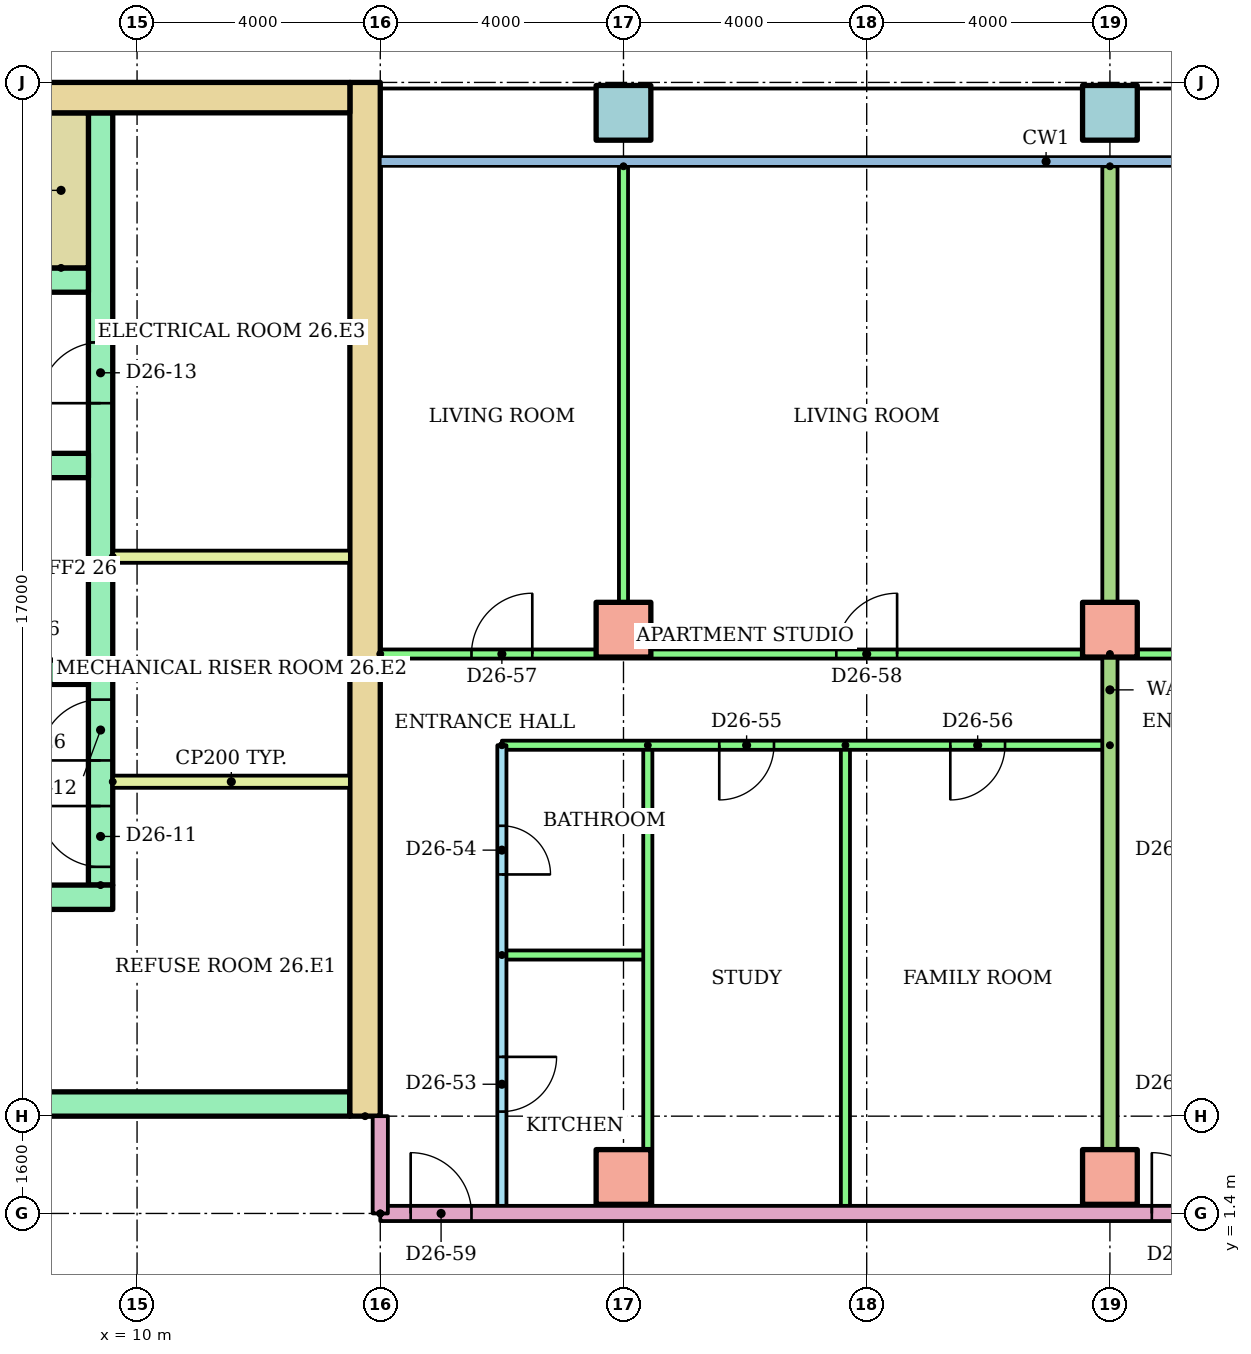
"""IFC4 building model, lengths in metres.
Left out: names, types, materials, properties, quantities, classifications, styles, units other than length and angle.
Written with IfcOpenShell. Run it as: python <this file> out.ifc"""

import sys

from ifc_helpers import new_model, si_unit, direction, frame, frame_2d, origin, origin_2d, place, context, subcontext, project, spatial, rectangle, hollow_rectangle, extrude, element, fill, save


model = new_model("IFC4")
c1 = context("Model", 3, precision=1e-05, world=origin(), true_north=direction((0.0, 1.0)))
c2 = subcontext(c1, "Body", "Model", "MODEL_VIEW")
j1 = project(units=[si_unit("LENGTHUNIT", "METRE"), si_unit("PLANEANGLEUNIT", "RADIAN")], contexts=[c1])
p1 = place(None, origin())
s1 = spatial("IfcSite", under=j1, at=p1, CompositionType="ELEMENT")
p2 = place(p1, origin())
s2 = spatial("IfcBuilding", under=s1, at=p2, CompositionType="ELEMENT")
p3 = place(p2, frame((0.0, 0.0, 99.9)))
s3 = spatial("IfcBuildingStorey", under=s2, at=p3, CompositionType="ELEMENT", Elevation=99.9)
for number, where in (
    (1, (18.0, 2.0, 0.0)),
    (2, (26.0, 2.0, 0.0)),
    (3, (18.0, 11.0, 0.0)),
    (4, (26.0, 11.0, 0.0)),
):
    element("IfcColumn", number, at=place(p3, frame(where)), inside=s3, PredefinedType="COLUMN", context=c2, shape_type="SweptSolid", body=[
        extrude(rectangle(XDim=0.9, YDim=0.9, at=origin_2d()), origin(), (0.0, 0.0, 1.0), 3.2),
    ])
for number, where in (
    (5, (18.0, 19.5, 0.0)),
    (6, (26.0, 19.5, 0.0)),
):
    element("IfcColumn", number, at=place(p3, frame(where)), inside=s3, PredefinedType="COLUMN", context=c2, shape_type="SweptSolid", body=[
        extrude(hollow_rectangle(XDim=0.9, YDim=0.9, WallThickness=0.045, at=origin_2d()), origin(), (0.0, 0.0, 1.0), 3.2),
    ])
p4 = place(p3, frame((13.75, 3.0, 0.0), z_axis=(0.0, 0.0, 1.0), x_axis=(0.0, 1.0, 0.0)))
e7 = element("IfcWall", 7, at=p4, inside=s3, PredefinedType="SHEAR", context=c2, shape_type="SweptSolid", body=[
    extrude(rectangle(XDim=17.0, YDim=0.5, at=frame_2d((8.5, 0.0))), origin(), (0.0, 0.0, 1.0), 2.92),
])
p5 = place(p3, frame((-13.5, 19.75, 0.0)))
e8 = element("IfcWall", 8, at=p5, inside=s3, PredefinedType="SHEAR", context=c2, shape_type="SweptSolid", body=[
    extrude(rectangle(XDim=27.0, YDim=0.5, at=frame_2d((13.5, 0.0))), origin(), (0.0, 0.0, 1.0), 2.92),
])
p6 = place(p3, frame((9.4, 6.8, 0.0), z_axis=(0.0, 0.0, 1.0), x_axis=(0.0, 1.0, 0.0)))
e9 = element("IfcWall", 9, at=p6, inside=s3, PredefinedType="SHEAR", context=c2, shape_type="SweptSolid", body=[
    extrude(rectangle(XDim=12.7, YDim=0.4, at=frame_2d((6.35, 0.0))), origin(), (0.0, 0.0, 1.0), 2.92),
])
p7 = place(p6, frame((0.3, 0.0, 0.0)))
e10 = element("IfcOpeningElement", 10, at=p7, cuts=e9, PredefinedType="OPENING", context=c2, shape_type="SweptSolid", body=[
    extrude(rectangle(XDim=1.0, YDim=2.1, at=frame_2d((0.5, 1.05))), frame((0.0, 0.21, 0.0), z_axis=(0.0, -1.0, 0.0), x_axis=(1.0, 0.0, 0.0)), (0.0, 0.0, 1.0), 0.42),
])
p8 = place(p6, frame((2.05, 0.0, 0.0)))
e11 = element("IfcOpeningElement", 11, at=p8, cuts=e9, PredefinedType="OPENING", context=c2, shape_type="SweptSolid", body=[
    extrude(rectangle(XDim=1.0, YDim=2.1, at=frame_2d((0.5, 1.05))), frame((0.0, 0.21, 0.0), z_axis=(0.0, -1.0, 0.0), x_axis=(1.0, 0.0, 0.0)), (0.0, 0.0, 1.0), 0.42),
])
p9 = place(p6, frame((7.925, 0.0, 0.0)))
e12 = element("IfcOpeningElement", 12, at=p9, cuts=e9, PredefinedType="OPENING", context=c2, shape_type="SweptSolid", body=[
    extrude(rectangle(XDim=1.0, YDim=2.1, at=frame_2d((0.5, 1.05))), frame((0.0, 0.21, 0.0), z_axis=(0.0, -1.0, 0.0), x_axis=(1.0, 0.0, 0.0)), (0.0, 0.0, 1.0), 0.42),
])
p10 = place(p3, frame((-13.5, 3.2, 0.0)))
e13 = element("IfcWall", 13, at=p10, inside=s3, PredefinedType="SHEAR", context=c2, shape_type="SweptSolid", body=[
    extrude(rectangle(XDim=27.0, YDim=0.4, at=frame_2d((13.5, 0.0))), origin(), (0.0, 0.0, 1.0), 2.92),
])
p11 = place(p10, frame((6.861, 0.0, 0.0)))
e14 = element("IfcOpeningElement", 14, at=p11, cuts=e13, PredefinedType="OPENING", context=c2, shape_type="SweptSolid", body=[
    extrude(rectangle(XDim=1.1, YDim=2.1, at=frame_2d((0.55, 1.05))), frame((0.0, 0.21, 0.0), z_axis=(0.0, -1.0, 0.0), x_axis=(1.0, 0.0, 0.0)), (0.0, 0.0, 1.0), 0.42),
])
p12 = place(p10, frame((9.906, 0.0, 0.0)))
e15 = element("IfcOpeningElement", 15, at=p12, cuts=e13, PredefinedType="OPENING", context=c2, shape_type="SweptSolid", body=[
    extrude(rectangle(XDim=1.1, YDim=2.1, at=frame_2d((0.55, 1.05))), frame((0.0, 0.21, 0.0), z_axis=(0.0, -1.0, 0.0), x_axis=(1.0, 0.0, 0.0)), (0.0, 0.0, 1.0), 0.42),
])
p13 = place(p10, frame((15.994, 0.0, 0.0)))
e16 = element("IfcOpeningElement", 16, at=p13, cuts=e13, PredefinedType="OPENING", context=c2, shape_type="SweptSolid", body=[
    extrude(rectangle(XDim=1.1, YDim=2.1, at=frame_2d((0.55, 1.05))), frame((0.0, 0.21, 0.0), z_axis=(0.0, -1.0, 0.0), x_axis=(1.0, 0.0, 0.0)), (0.0, 0.0, 1.0), 0.42),
])
p14 = place(p10, frame((19.039, 0.0, 0.0)))
e17 = element("IfcOpeningElement", 17, at=p14, cuts=e13, PredefinedType="OPENING", context=c2, shape_type="SweptSolid", body=[
    extrude(rectangle(XDim=1.1, YDim=2.1, at=frame_2d((0.55, 1.05))), frame((0.0, 0.21, 0.0), z_axis=(0.0, -1.0, 0.0), x_axis=(1.0, 0.0, 0.0)), (0.0, 0.0, 1.0), 0.42),
])
p15 = place(p10, frame((12.6, 0.0, 0.0)))
e18 = element("IfcOpeningElement", 18, at=p15, cuts=e13, PredefinedType="OPENING", context=c2, shape_type="SweptSolid", body=[
    extrude(rectangle(XDim=1.8, YDim=2.1, at=frame_2d((0.9, 1.05))), frame((0.0, 0.21, 0.0), z_axis=(0.0, -1.0, 0.0), x_axis=(1.0, 0.0, 0.0)), (0.0, 0.0, 1.0), 0.42),
])
p16 = place(p3, frame((1.522, 6.6, 0.0)))
e19 = element("IfcWall", 19, at=p16, inside=s3, PredefinedType="SHEAR", context=c2, shape_type="SweptSolid", body=[
    extrude(rectangle(XDim=8.078, YDim=0.4, at=frame_2d((4.039, 0.0))), origin(), (0.0, 0.0, 1.0), 2.92),
])
p17 = place(p3, frame((1.2, 10.3, 0.0)))
e20 = element("IfcWall", 20, at=p17, inside=s3, PredefinedType="SHEAR", context=c2, shape_type="SweptSolid", body=[
    extrude(rectangle(XDim=8.0, YDim=0.4, at=frame_2d((4.0, 0.0))), origin(), (0.0, 0.0, 1.0), 2.92),
])
p18 = place(p17, frame((3.55, 0.0, 0.0)))
e21 = element("IfcOpeningElement", 21, at=p18, cuts=e20, PredefinedType="OPENING", context=c2, shape_type="SweptSolid", body=[
    extrude(rectangle(XDim=1.1, YDim=2.1, at=frame_2d((0.55, 1.05))), frame((0.0, 0.21, 0.0), z_axis=(0.0, -1.0, 0.0), x_axis=(1.0, 0.0, 0.0)), (0.0, 0.0, 1.0), 0.42),
])
p19 = place(p17, frame((6.283, 0.0, 0.0)))
e22 = element("IfcOpeningElement", 22, at=p19, cuts=e20, PredefinedType="OPENING", context=c2, shape_type="SweptSolid", body=[
    extrude(rectangle(XDim=1.1, YDim=2.1, at=frame_2d((0.55, 1.05))), frame((0.0, 0.21, 0.0), z_axis=(0.0, -1.0, 0.0), x_axis=(1.0, 0.0, 0.0)), (0.0, 0.0, 1.0), 0.42),
])
p20 = place(p17, frame((0.867, 0.0, 0.0)))
e23 = element("IfcOpeningElement", 23, at=p20, cuts=e20, PredefinedType="OPENING", context=c2, shape_type="SweptSolid", body=[
    extrude(rectangle(XDim=1.0, YDim=2.1, at=frame_2d((0.5, 1.05))), frame((0.0, 0.21, 0.0), z_axis=(0.0, -1.0, 0.0), x_axis=(1.0, 0.0, 0.0)), (0.0, 0.0, 1.0), 0.42),
])
p21 = place(p3, frame((1.2, 13.7, 0.0)))
e24 = element("IfcWall", 24, at=p21, inside=s3, PredefinedType="SHEAR", context=c2, shape_type="SweptSolid", body=[
    extrude(rectangle(XDim=8.0, YDim=0.4, at=frame_2d((4.0, 0.0))), origin(), (0.0, 0.0, 1.0), 2.92),
])
p22 = place(p3, frame((-9.2, 16.75, 0.0)))
e25 = element("IfcWall", 25, at=p22, inside=s3, PredefinedType="SHEAR", context=c2, shape_type="SweptSolid", body=[
    extrude(rectangle(XDim=18.4, YDim=0.4, at=frame_2d((9.2, 0.0))), origin(), (0.0, 0.0, 1.0), 2.92),
])
p23 = place(p22, frame((0.1, 0.0, 0.0)))
e26 = element("IfcOpeningElement", 26, at=p23, cuts=e25, PredefinedType="OPENING", context=c2, shape_type="SweptSolid", body=[
    extrude(rectangle(XDim=0.95, YDim=2.1, at=frame_2d((0.475, 1.05))), frame((0.0, 0.21, 0.0), z_axis=(0.0, -1.0, 0.0), x_axis=(1.0, 0.0, 0.0)), (0.0, 0.0, 1.0), 0.42),
])
p24 = place(p22, frame((6.1, 0.0, 0.0)))
e27 = element("IfcOpeningElement", 27, at=p24, cuts=e25, PredefinedType="OPENING", context=c2, shape_type="SweptSolid", body=[
    extrude(rectangle(XDim=0.95, YDim=2.1, at=frame_2d((0.475, 1.05))), frame((0.0, 0.21, 0.0), z_axis=(0.0, -1.0, 0.0), x_axis=(1.0, 0.0, 0.0)), (0.0, 0.0, 1.0), 0.42),
])
p25 = place(p22, frame((12.1, 0.0, 0.0)))
e28 = element("IfcOpeningElement", 28, at=p25, cuts=e25, PredefinedType="OPENING", context=c2, shape_type="SweptSolid", body=[
    extrude(rectangle(XDim=0.95, YDim=2.1, at=frame_2d((0.475, 1.05))), frame((0.0, 0.21, 0.0), z_axis=(0.0, -1.0, 0.0), x_axis=(1.0, 0.0, 0.0)), (0.0, 0.0, 1.0), 0.42),
])
p26 = place(p3, frame((8.75, 16.95, 0.0), z_axis=(0.0, 0.0, 1.0), x_axis=(0.0, 1.0, 0.0)))
e29 = element("IfcWall", 29, at=p26, inside=s3, PredefinedType="SHEAR", context=c2, shape_type="SweptSolid", body=[
    extrude(rectangle(XDim=2.55, YDim=0.9, at=frame_2d((1.275, 0.0))), origin(), (0.0, 0.0, 1.0), 2.92),
])
for number, where in (
    (30, (9.6, 8.5, 0.0)),
    (31, (9.6, 12.2, 0.0)),
):
    element("IfcWall", number, at=place(p3, frame(where)), inside=s3, PredefinedType="PARTITIONING", context=c2, shape_type="SweptSolid", body=[
        extrude(rectangle(XDim=3.9, YDim=0.2, at=frame_2d((1.95, 0.0))), origin(), (0.0, 0.0, 1.0), 2.92),
    ])
p27 = place(p3, frame((16.0, 9.1, 0.0), z_axis=(0.0, 0.0, 1.0), x_axis=(0.0, -1.0, 0.0)))
e32 = element("IfcWall", 32, at=p27, inside=s3, PredefinedType="PARTITIONING", context=c2, shape_type="SweptSolid", body=[
    extrude(rectangle(XDim=7.7, YDim=0.15, at=frame_2d((3.85, 0.0))), origin(), (0.0, 0.0, 1.0), 2.4),
])
p28 = place(p27, frame((5.125, 0.0, 0.0)))
e33 = element("IfcOpeningElement", 33, at=p28, cuts=e32, PredefinedType="OPENING", context=c2, shape_type="SweptSolid", body=[
    extrude(rectangle(XDim=0.9, YDim=2.1, at=frame_2d((0.45, 1.05))), frame((0.0, 0.085, 0.0), z_axis=(0.0, -1.0, 0.0), x_axis=(1.0, 0.0, 0.0)), (0.0, 0.0, 1.0), 0.17),
])
p29 = place(p27, frame((1.325, 0.0, 0.0)))
e34 = element("IfcOpeningElement", 34, at=p29, cuts=e32, PredefinedType="OPENING", context=c2, shape_type="SweptSolid", body=[
    extrude(rectangle(XDim=0.8, YDim=2.1, at=frame_2d((0.4, 1.05))), frame((0.0, 0.085, 0.0), z_axis=(0.0, -1.0, 0.0), x_axis=(1.0, 0.0, 0.0)), (0.0, 0.0, 1.0), 0.17),
])
p30 = place(p3, frame((16.0, 5.65, 0.0)))
e35 = element("IfcWall", 35, at=p30, inside=s3, PredefinedType="PARTITIONING", context=c2, shape_type="SweptSolid", body=[
    extrude(rectangle(XDim=2.4, YDim=0.15, at=frame_2d((1.2, 0.0))), origin(), (0.0, 0.0, 1.0), 2.4),
])
for number, where, z_axis, x_axis in (
    (36, (18.4, 9.1, 0.0), (0.0, 0.0, 1.0), (0.0, -1.0, 0.0)),
    (37, (21.65, 9.1, 0.0), (0.0, 0.0, 1.0), (0.0, -1.0, 0.0)),
):
    element("IfcWall", number, at=place(p3, frame(where, z_axis=z_axis, x_axis=x_axis)), inside=s3, PredefinedType="PARTITIONING", context=c2, shape_type="SweptSolid", body=[
        extrude(rectangle(XDim=7.7, YDim=0.15, at=frame_2d((3.85, 0.0))), origin(), (0.0, 0.0, 1.0), 2.4),
    ])
p31 = place(p3, frame((26.0, 9.1, 0.0), z_axis=(0.0, 0.0, 1.0), x_axis=(-1.0, 0.0, 0.0)))
e38 = element("IfcWall", 38, at=p31, inside=s3, PredefinedType="PARTITIONING", context=c2, shape_type="SweptSolid", body=[
    extrude(rectangle(XDim=10.0, YDim=0.15, at=frame_2d((5.0, 0.0))), origin(), (0.0, 0.0, 1.0), 2.4),
])
p32 = place(p31, frame((5.525, 0.0, 0.0)))
e39 = element("IfcOpeningElement", 39, at=p32, cuts=e38, PredefinedType="OPENING", context=c2, shape_type="SweptSolid", body=[
    extrude(rectangle(XDim=0.9, YDim=2.1, at=frame_2d((0.45, 1.05))), frame((0.0, 0.085, 0.0), z_axis=(0.0, -1.0, 0.0), x_axis=(1.0, 0.0, 0.0)), (0.0, 0.0, 1.0), 0.17),
])
p33 = place(p31, frame((1.725, 0.0, 0.0)))
e40 = element("IfcOpeningElement", 40, at=p33, cuts=e38, PredefinedType="OPENING", context=c2, shape_type="SweptSolid", body=[
    extrude(rectangle(XDim=0.9, YDim=2.1, at=frame_2d((0.45, 1.05))), frame((0.0, 0.085, 0.0), z_axis=(0.0, -1.0, 0.0), x_axis=(1.0, 0.0, 0.0)), (0.0, 0.0, 1.0), 0.17),
])
p34 = place(p3, frame((14.0, 10.6, 0.0)))
e41 = element("IfcWall", 41, at=p34, inside=s3, PredefinedType="PARTITIONING", context=c2, shape_type="SweptSolid", body=[
    extrude(rectangle(XDim=12.0, YDim=0.15, at=frame_2d((6.0, 0.0))), origin(), (0.0, 0.0, 1.0), 2.4),
])
p35 = place(p34, frame((1.5, 0.0, 0.0)))
e42 = element("IfcOpeningElement", 42, at=p35, cuts=e41, PredefinedType="OPENING", context=c2, shape_type="SweptSolid", body=[
    extrude(rectangle(XDim=1.0, YDim=2.1, at=frame_2d((0.5, 1.05))), frame((0.0, 0.085, 0.0), z_axis=(0.0, -1.0, 0.0), x_axis=(1.0, 0.0, 0.0)), (0.0, 0.0, 1.0), 0.17),
])
p36 = place(p34, frame((7.5, 0.0, 0.0)))
e43 = element("IfcOpeningElement", 43, at=p36, cuts=e41, PredefinedType="OPENING", context=c2, shape_type="SweptSolid", body=[
    extrude(rectangle(XDim=1.0, YDim=2.1, at=frame_2d((0.5, 1.05))), frame((0.0, 0.085, 0.0), z_axis=(0.0, -1.0, 0.0), x_axis=(1.0, 0.0, 0.0)), (0.0, 0.0, 1.0), 0.17),
])
p37 = place(p3, frame((18.0, 18.621, 0.0), z_axis=(0.0, 0.0, 1.0), x_axis=(0.0, -1.0, 0.0)))
e44 = element("IfcWall", 44, at=p37, inside=s3, PredefinedType="PARTITIONING", context=c2, shape_type="SweptSolid", body=[
    extrude(rectangle(XDim=8.021, YDim=0.15, at=frame_2d((4.01, 0.0))), origin(), (0.0, 0.0, 1.0), 2.4),
])
p38 = place(p3, frame((26.0, 10.6, 0.0)))
e45 = element("IfcWall", 45, at=p38, inside=s3, PredefinedType="PARTITIONING", context=c2, shape_type="SweptSolid", body=[
    extrude(rectangle(XDim=14.61, YDim=0.15, at=frame_2d((7.305, 0.0))), origin(), (0.0, 0.0, 1.0), 2.4),
])
p39 = place(p38, frame((3.5, 0.0, 0.0)))
e46 = element("IfcOpeningElement", 46, at=p39, cuts=e45, PredefinedType="OPENING", context=c2, shape_type="SweptSolid", body=[
    extrude(rectangle(XDim=1.0, YDim=2.1, at=frame_2d((0.5, 1.05))), frame((0.0, 0.085, 0.0), z_axis=(0.0, -1.0, 0.0), x_axis=(1.0, 0.0, 0.0)), (0.0, 0.0, 1.0), 0.17),
])
p40 = place(p38, frame((10.75, 0.0, 0.0)))
e47 = element("IfcOpeningElement", 47, at=p40, cuts=e45, PredefinedType="OPENING", context=c2, shape_type="SweptSolid", body=[
    extrude(rectangle(XDim=0.9, YDim=2.1, at=frame_2d((0.45, 1.05))), frame((0.0, 0.085, 0.0), z_axis=(0.0, -1.0, 0.0), x_axis=(1.0, 0.0, 0.0)), (0.0, 0.0, 1.0), 0.17),
])
p41 = place(p3, frame((26.0, 18.621, 0.0), z_axis=(0.0, 0.0, 1.0), x_axis=(0.0, -1.0, 0.0)))
e48 = element("IfcWall", 48, at=p41, inside=s3, PredefinedType="PARTITIONING", context=c2, shape_type="SweptSolid", body=[
    extrude(rectangle(XDim=17.221, YDim=0.25, at=frame_2d((8.611, 0.0))), origin(), (0.0, 0.0, 1.0), 2.4),
])
p42 = place(p3, frame((14.0, 1.4, 0.0)))
e49 = element("IfcWall", 49, at=p42, inside=s3, PredefinedType="PARTITIONING", context=c2, shape_type="SweptSolid", body=[
    extrude(rectangle(XDim=15.0, YDim=0.25, at=frame_2d((7.5, 0.0))), origin(), (0.0, 0.0, 1.0), 2.4),
])
p43 = place(p42, frame((0.5, 0.0, 0.0)))
e50 = element("IfcOpeningElement", 50, at=p43, cuts=e49, PredefinedType="OPENING", context=c2, shape_type="SweptSolid", body=[
    extrude(rectangle(XDim=1.0, YDim=2.1, at=frame_2d((0.5, 1.05))), frame((0.0, 0.135, 0.0), z_axis=(0.0, -1.0, 0.0), x_axis=(1.0, 0.0, 0.0)), (0.0, 0.0, 1.0), 0.27),
])
p44 = place(p42, frame((12.689, 0.0, 0.0)))
e51 = element("IfcOpeningElement", 51, at=p44, cuts=e49, PredefinedType="OPENING", context=c2, shape_type="SweptSolid", body=[
    extrude(rectangle(XDim=1.0, YDim=2.1, at=frame_2d((0.5, 1.05))), frame((0.0, 0.135, 0.0), z_axis=(0.0, -1.0, 0.0), x_axis=(1.0, 0.0, 0.0)), (0.0, 0.0, 1.0), 0.27),
])
p45 = place(p3, frame((14.0, 1.4, 0.0), z_axis=(0.0, 0.0, 1.0), x_axis=(0.0, 1.0, 0.0)))
e52 = element("IfcWall", 52, at=p45, inside=s3, PredefinedType="PARTITIONING", context=c2, shape_type="SweptSolid", body=[
    extrude(rectangle(XDim=1.6, YDim=0.25, at=frame_2d((0.8, 0.0))), origin(), (0.0, 0.0, 1.0), 2.4),
])
p46 = place(p7, origin())
e53 = element("IfcDoor", 53, at=p46, inside=s3, OperationType="SINGLE_SWING_RIGHT", PredefinedType="DOOR", context=c2, shape_type="SweptSolid", body=[
    extrude(rectangle(XDim=1.0, YDim=2.1, at=frame_2d((0.5, 1.05))), frame((0.0, 0.025, 0.0), z_axis=(0.0, -1.0, 0.0), x_axis=(1.0, 0.0, 0.0)), (0.0, 0.0, 1.0), 0.05),
])
fill(e10, e53)
p47 = place(p8, origin())
e54 = element("IfcDoor", 54, at=p47, inside=s3, OperationType="SINGLE_SWING_LEFT", PredefinedType="DOOR", context=c2, shape_type="SweptSolid", body=[
    extrude(rectangle(XDim=1.0, YDim=2.1, at=frame_2d((0.5, 1.05))), frame((0.0, 0.025, 0.0), z_axis=(0.0, -1.0, 0.0), x_axis=(1.0, 0.0, 0.0)), (0.0, 0.0, 1.0), 0.05),
])
fill(e11, e54)
p48 = place(p9, origin())
e55 = element("IfcDoor", 55, at=p48, inside=s3, OperationType="SINGLE_SWING_LEFT", PredefinedType="DOOR", context=c2, shape_type="SweptSolid", body=[
    extrude(rectangle(XDim=1.0, YDim=2.1, at=frame_2d((0.5, 1.05))), frame((0.0, 0.025, 0.0), z_axis=(0.0, -1.0, 0.0), x_axis=(1.0, 0.0, 0.0)), (0.0, 0.0, 1.0), 0.05),
])
fill(e12, e55)
p49 = place(p28, origin())
e56 = element("IfcDoor", 56, at=p49, inside=s3, OperationType="SINGLE_SWING_LEFT", PredefinedType="DOOR", context=c2, shape_type="SweptSolid", body=[
    extrude(rectangle(XDim=0.9, YDim=2.1, at=frame_2d((0.45, 1.05))), frame((0.0, 0.025, 0.0), z_axis=(0.0, -1.0, 0.0), x_axis=(1.0, 0.0, 0.0)), (0.0, 0.0, 1.0), 0.05),
])
fill(e33, e56)
p50 = place(p29, origin())
e57 = element("IfcDoor", 57, at=p50, inside=s3, OperationType="SINGLE_SWING_RIGHT", PredefinedType="DOOR", context=c2, shape_type="SweptSolid", body=[
    extrude(rectangle(XDim=0.8, YDim=2.1, at=frame_2d((0.4, 1.05))), frame((0.0, 0.025, 0.0), z_axis=(0.0, -1.0, 0.0), x_axis=(1.0, 0.0, 0.0)), (0.0, 0.0, 1.0), 0.05),
])
fill(e34, e57)
p51 = place(p32, origin())
e58 = element("IfcDoor", 58, at=p51, inside=s3, OperationType="SINGLE_SWING_RIGHT", PredefinedType="DOOR", context=c2, shape_type="SweptSolid", body=[
    extrude(rectangle(XDim=0.9, YDim=2.1, at=frame_2d((0.45, 1.05))), frame((0.0, 0.025, 0.0), z_axis=(0.0, -1.0, 0.0), x_axis=(1.0, 0.0, 0.0)), (0.0, 0.0, 1.0), 0.05),
])
fill(e39, e58)
p52 = place(p33, origin())
e59 = element("IfcDoor", 59, at=p52, inside=s3, OperationType="SINGLE_SWING_RIGHT", PredefinedType="DOOR", context=c2, shape_type="SweptSolid", body=[
    extrude(rectangle(XDim=0.9, YDim=2.1, at=frame_2d((0.45, 1.05))), frame((0.0, 0.025, 0.0), z_axis=(0.0, -1.0, 0.0), x_axis=(1.0, 0.0, 0.0)), (0.0, 0.0, 1.0), 0.05),
])
fill(e40, e59)
p53 = place(p35, origin())
e60 = element("IfcDoor", 60, at=p53, inside=s3, OperationType="SINGLE_SWING_RIGHT", PredefinedType="DOOR", context=c2, shape_type="SweptSolid", body=[
    extrude(rectangle(XDim=1.0, YDim=2.1, at=frame_2d((0.5, 1.05))), frame((0.0, 0.025, 0.0), z_axis=(0.0, -1.0, 0.0), x_axis=(1.0, 0.0, 0.0)), (0.0, 0.0, 1.0), 0.05),
])
fill(e42, e60)
p54 = place(p36, origin())
e61 = element("IfcDoor", 61, at=p54, inside=s3, OperationType="SINGLE_SWING_RIGHT", PredefinedType="DOOR", context=c2, shape_type="SweptSolid", body=[
    extrude(rectangle(XDim=1.0, YDim=2.1, at=frame_2d((0.5, 1.05))), frame((0.0, 0.025, 0.0), z_axis=(0.0, -1.0, 0.0), x_axis=(1.0, 0.0, 0.0)), (0.0, 0.0, 1.0), 0.05),
])
fill(e43, e61)
p55 = place(p43, origin())
e62 = element("IfcDoor", 62, at=p55, inside=s3, OperationType="SINGLE_SWING_LEFT", PredefinedType="DOOR", context=c2, shape_type="SweptSolid", body=[
    extrude(rectangle(XDim=1.0, YDim=2.1, at=frame_2d((0.5, 1.05))), frame((0.0, 0.025, 0.0), z_axis=(0.0, -1.0, 0.0), x_axis=(1.0, 0.0, 0.0)), (0.0, 0.0, 1.0), 0.05),
])
fill(e50, e62)
p56 = place(p44, origin())
e63 = element("IfcDoor", 63, at=p56, inside=s3, OperationType="SINGLE_SWING_LEFT", PredefinedType="DOOR", context=c2, shape_type="SweptSolid", body=[
    extrude(rectangle(XDim=1.0, YDim=2.1, at=frame_2d((0.5, 1.05))), frame((0.0, 0.025, 0.0), z_axis=(0.0, -1.0, 0.0), x_axis=(1.0, 0.0, 0.0)), (0.0, 0.0, 1.0), 0.05),
])
fill(e51, e63)
save(model, sys.argv[1])
